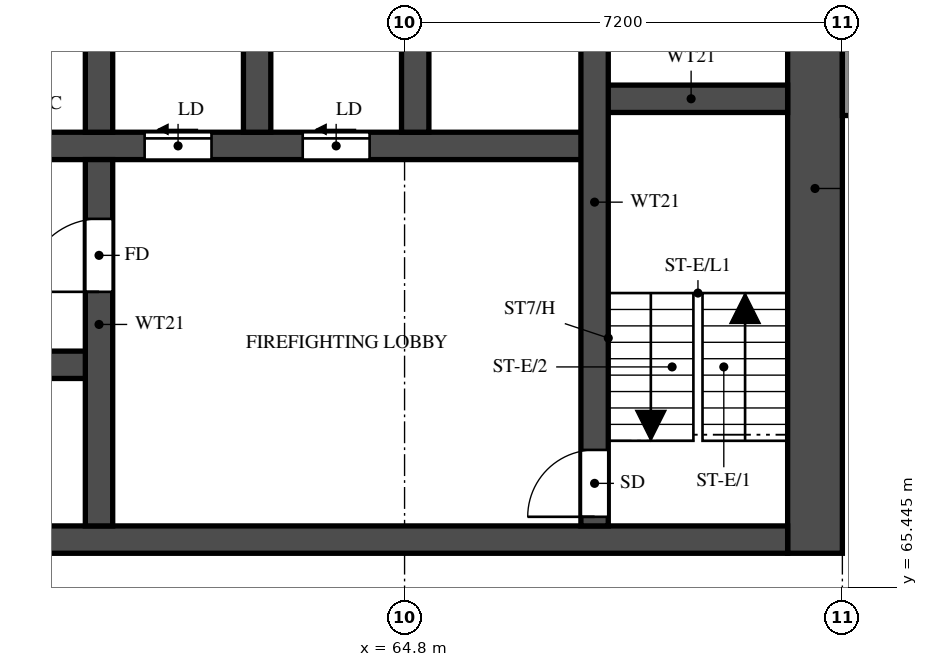
"""IFC4 building model, lengths in metres.
Left out: names, types, materials, properties, quantities, classifications, styles, units other than length and angle.
Written with IfcOpenShell. Run it as: python <this file> out.ifc"""

import sys

from ifc_helpers import new_model, si_unit, direction, frame, frame_2d, origin, place, context, subcontext, project, spatial, rectangle, extrude, element, fill, save


model = new_model("IFC4")
c1 = context("Model", 3, precision=1e-05, world=origin(), true_north=direction((0.0, 1.0)))
c2 = subcontext(c1, "Body", "Model", "MODEL_VIEW")
j1 = project(units=[si_unit("LENGTHUNIT", "METRE"), si_unit("PLANEANGLEUNIT", "RADIAN")], contexts=[c1])
p1 = place(None, origin())
s1 = spatial("IfcSite", under=j1, at=p1, CompositionType="ELEMENT")
p2 = place(p1, origin())
s2 = spatial("IfcBuilding", under=s1, at=p2, CompositionType="ELEMENT")
p3 = place(p2, frame((0.0, 0.0, 69.0)))
s3 = spatial("IfcBuildingStorey", under=s2, at=p3, CompositionType="ELEMENT", Elevation=69.0)
p4 = place(p3, frame((71.55, 66.0, 0.0), z_axis=(0.0, 0.0, 1.0), x_axis=(0.0, 1.0, 0.0)))
e1 = element("IfcWall", 1, at=p4, inside=s3, PredefinedType="SHEAR", context=c2, shape_type="SweptSolid", body=[
    extrude(rectangle(XDim=12.0, YDim=0.9, at=frame_2d((6.0, 0.0))), origin(), (0.0, 0.0, 1.0), 3.18),
])
p5 = place(p3, frame((29.7, 66.225, 0.0), z_axis=(0.0, 0.0, 1.0), x_axis=(1.0, 0.0, 0.0)))
e2 = element("IfcWall", 2, at=p5, inside=s3, PredefinedType="SHEAR", context=c2, shape_type="SweptSolid", body=[
    extrude(rectangle(XDim=41.4, YDim=0.45, at=frame_2d((20.7, 0.0))), origin(), (0.0, 0.0, 1.0), 3.18),
])
p6 = place(p5, frame((0.925, 0.0, 0.0)))
e3 = element("IfcOpeningElement", 3, at=p6, cuts=e2, PredefinedType="OPENING", context=c2, shape_type="SweptSolid", body=[
    extrude(rectangle(XDim=1.1, YDim=2.1, at=frame_2d((0.55, 1.05))), frame((0.0, 0.235, 0.0), z_axis=(0.0, -1.0, 0.0), x_axis=(1.0, 0.0, 0.0)), (0.0, 0.0, 1.0), 0.47),
])
p7 = place(p5, frame((3.738, 0.0, 0.0)))
e4 = element("IfcOpeningElement", 4, at=p7, cuts=e2, PredefinedType="OPENING", context=c2, shape_type="SweptSolid", body=[
    extrude(rectangle(XDim=1.8, YDim=2.1, at=frame_2d((0.9, 1.05))), frame((0.0, 0.235, 0.0), z_axis=(0.0, -1.0, 0.0), x_axis=(1.0, 0.0, 0.0)), (0.0, 0.0, 1.0), 0.47),
])
p8 = place(p3, frame((35.575, 69.1, 0.0), z_axis=(0.0, 0.0, 1.0), x_axis=(1.0, 0.0, 0.0)))
e5 = element("IfcWall", 5, at=p8, inside=s3, PredefinedType="SHEAR", context=c2, shape_type="SweptSolid", body=[
    extrude(rectangle(XDim=24.2, YDim=0.45, at=frame_2d((12.1, 0.0))), origin(), (0.0, 0.0, 1.0), 3.18),
])
p9 = place(p8, frame((1.05, 0.0, 0.0)))
e6 = element("IfcOpeningElement", 6, at=p9, cuts=e5, PredefinedType="OPENING", context=c2, shape_type="SweptSolid", body=[
    extrude(rectangle(XDim=1.1, YDim=2.1, at=frame_2d((0.55, 1.05))), frame((0.0, 0.235, 0.0), z_axis=(0.0, -1.0, 0.0), x_axis=(1.0, 0.0, 0.0)), (0.0, 0.0, 1.0), 0.47),
])
p10 = place(p8, frame((3.8, 0.0, 0.0)))
e7 = element("IfcOpeningElement", 7, at=p10, cuts=e5, PredefinedType="OPENING", context=c2, shape_type="SweptSolid", body=[
    extrude(rectangle(XDim=1.1, YDim=2.1, at=frame_2d((0.55, 1.05))), frame((0.0, 0.235, 0.0), z_axis=(0.0, -1.0, 0.0), x_axis=(1.0, 0.0, 0.0)), (0.0, 0.0, 1.0), 0.47),
])
p11 = place(p8, frame((6.55, 0.0, 0.0)))
e8 = element("IfcOpeningElement", 8, at=p11, cuts=e5, PredefinedType="OPENING", context=c2, shape_type="SweptSolid", body=[
    extrude(rectangle(XDim=1.1, YDim=2.1, at=frame_2d((0.55, 1.05))), frame((0.0, 0.235, 0.0), z_axis=(0.0, -1.0, 0.0), x_axis=(1.0, 0.0, 0.0)), (0.0, 0.0, 1.0), 0.47),
])
p12 = place(p8, frame((9.3, 0.0, 0.0)))
e9 = element("IfcOpeningElement", 9, at=p12, cuts=e5, PredefinedType="OPENING", context=c2, shape_type="SweptSolid", body=[
    extrude(rectangle(XDim=1.1, YDim=2.1, at=frame_2d((0.55, 1.05))), frame((0.0, 0.235, 0.0), z_axis=(0.0, -1.0, 0.0), x_axis=(1.0, 0.0, 0.0)), (0.0, 0.0, 1.0), 0.47),
])
p13 = place(p8, frame((12.05, 0.0, 0.0)))
e10 = element("IfcOpeningElement", 10, at=p13, cuts=e5, PredefinedType="OPENING", context=c2, shape_type="SweptSolid", body=[
    extrude(rectangle(XDim=1.1, YDim=2.1, at=frame_2d((0.55, 1.05))), frame((0.0, 0.235, 0.0), z_axis=(0.0, -1.0, 0.0), x_axis=(1.0, 0.0, 0.0)), (0.0, 0.0, 1.0), 0.47),
])
p14 = place(p8, frame((14.8, 0.0, 0.0)))
e11 = element("IfcOpeningElement", 11, at=p14, cuts=e5, PredefinedType="OPENING", context=c2, shape_type="SweptSolid", body=[
    extrude(rectangle(XDim=1.1, YDim=2.1, at=frame_2d((0.55, 1.05))), frame((0.0, 0.235, 0.0), z_axis=(0.0, -1.0, 0.0), x_axis=(1.0, 0.0, 0.0)), (0.0, 0.0, 1.0), 0.47),
])
p15 = place(p3, frame((32.875, 72.7, 0.0), z_axis=(0.0, 0.0, 1.0), x_axis=(1.0, 0.0, 0.0)))
e12 = element("IfcWall", 12, at=p15, inside=s3, PredefinedType="SHEAR", context=c2, shape_type="SweptSolid", body=[
    extrude(rectangle(XDim=35.05, YDim=0.45, at=frame_2d((17.525, 0.0))), origin(), (0.0, 0.0, 1.0), 3.18),
])
p16 = place(p15, frame((19.8, 0.0, 0.0)))
e13 = element("IfcOpeningElement", 13, at=p16, cuts=e12, PredefinedType="OPENING", context=c2, shape_type="SweptSolid", body=[
    extrude(rectangle(XDim=1.1, YDim=2.1, at=frame_2d((0.55, 1.05))), frame((0.0, 0.235, 0.0), z_axis=(0.0, -1.0, 0.0), x_axis=(1.0, 0.0, 0.0)), (0.0, 0.0, 1.0), 0.47),
])
p17 = place(p15, frame((27.65, 0.0, 0.0)))
e14 = element("IfcOpeningElement", 14, at=p17, cuts=e12, PredefinedType="OPENING", context=c2, shape_type="SweptSolid", body=[
    extrude(rectangle(XDim=1.1, YDim=2.1, at=frame_2d((0.55, 1.05))), frame((0.0, 0.235, 0.0), z_axis=(0.0, -1.0, 0.0), x_axis=(1.0, 0.0, 0.0)), (0.0, 0.0, 1.0), 0.47),
])
p18 = place(p15, frame((30.25, 0.0, 0.0)))
e15 = element("IfcOpeningElement", 15, at=p18, cuts=e12, PredefinedType="OPENING", context=c2, shape_type="SweptSolid", body=[
    extrude(rectangle(XDim=1.1, YDim=2.1, at=frame_2d((0.55, 1.05))), frame((0.0, 0.235, 0.0), z_axis=(0.0, -1.0, 0.0), x_axis=(1.0, 0.0, 0.0)), (0.0, 0.0, 1.0), 0.47),
])
p19 = place(p15, frame((3.75, 0.0, 0.0)))
e16 = element("IfcOpeningElement", 16, at=p19, cuts=e12, PredefinedType="OPENING", context=c2, shape_type="SweptSolid", body=[
    extrude(rectangle(XDim=1.1, YDim=2.1, at=frame_2d((0.55, 1.05))), frame((0.0, 0.235, 0.0), z_axis=(0.0, -1.0, 0.0), x_axis=(1.0, 0.0, 0.0)), (0.0, 0.0, 1.0), 0.47),
])
p20 = place(p15, frame((6.5, 0.0, 0.0)))
e17 = element("IfcOpeningElement", 17, at=p20, cuts=e12, PredefinedType="OPENING", context=c2, shape_type="SweptSolid", body=[
    extrude(rectangle(XDim=1.1, YDim=2.1, at=frame_2d((0.55, 1.05))), frame((0.0, 0.235, 0.0), z_axis=(0.0, -1.0, 0.0), x_axis=(1.0, 0.0, 0.0)), (0.0, 0.0, 1.0), 0.47),
])
p21 = place(p15, frame((9.25, 0.0, 0.0)))
e18 = element("IfcOpeningElement", 18, at=p21, cuts=e12, PredefinedType="OPENING", context=c2, shape_type="SweptSolid", body=[
    extrude(rectangle(XDim=1.1, YDim=2.1, at=frame_2d((0.55, 1.05))), frame((0.0, 0.235, 0.0), z_axis=(0.0, -1.0, 0.0), x_axis=(1.0, 0.0, 0.0)), (0.0, 0.0, 1.0), 0.47),
])
p22 = place(p15, frame((12.0, 0.0, 0.0)))
e19 = element("IfcOpeningElement", 19, at=p22, cuts=e12, PredefinedType="OPENING", context=c2, shape_type="SweptSolid", body=[
    extrude(rectangle(XDim=1.1, YDim=2.1, at=frame_2d((0.55, 1.05))), frame((0.0, 0.235, 0.0), z_axis=(0.0, -1.0, 0.0), x_axis=(1.0, 0.0, 0.0)), (0.0, 0.0, 1.0), 0.47),
])
p23 = place(p15, frame((14.75, 0.0, 0.0)))
e20 = element("IfcOpeningElement", 20, at=p23, cuts=e12, PredefinedType="OPENING", context=c2, shape_type="SweptSolid", body=[
    extrude(rectangle(XDim=1.1, YDim=2.1, at=frame_2d((0.55, 1.05))), frame((0.0, 0.235, 0.0), z_axis=(0.0, -1.0, 0.0), x_axis=(1.0, 0.0, 0.0)), (0.0, 0.0, 1.0), 0.47),
])
p24 = place(p15, frame((17.5, 0.0, 0.0)))
e21 = element("IfcOpeningElement", 21, at=p24, cuts=e12, PredefinedType="OPENING", context=c2, shape_type="SweptSolid", body=[
    extrude(rectangle(XDim=1.1, YDim=2.1, at=frame_2d((0.55, 1.05))), frame((0.0, 0.235, 0.0), z_axis=(0.0, -1.0, 0.0), x_axis=(1.0, 0.0, 0.0)), (0.0, 0.0, 1.0), 0.47),
])
p25 = place(p15, frame((0.913, 0.0, 0.0)))
e22 = element("IfcOpeningElement", 22, at=p25, cuts=e12, PredefinedType="OPENING", context=c2, shape_type="SweptSolid", body=[
    extrude(rectangle(XDim=1.1, YDim=2.1, at=frame_2d((0.55, 1.05))), frame((0.0, 0.235, 0.0), z_axis=(0.0, -1.0, 0.0), x_axis=(1.0, 0.0, 0.0)), (0.0, 0.0, 1.0), 0.47),
])
p26 = place(p3, frame((67.925, 73.475, 0.0), z_axis=(0.0, 0.0, 1.0), x_axis=(1.0, 0.0, 0.0)))
e23 = element("IfcWall", 23, at=p26, inside=s3, PredefinedType="SHEAR", context=c2, shape_type="SweptSolid", body=[
    extrude(rectangle(XDim=3.175, YDim=0.45, at=frame_2d((1.587, 0.0))), origin(), (0.0, 0.0, 1.0), 3.18),
])
p27 = place(p3, frame((67.925, 66.45, 0.0), z_axis=(0.0, 0.0, 1.0), x_axis=(0.0, 1.0, 0.0)))
e24 = element("IfcWall", 24, at=p27, inside=s3, PredefinedType="SHEAR", context=c2, shape_type="SweptSolid", body=[
    extrude(rectangle(XDim=10.65, YDim=0.45, at=frame_2d((5.325, 0.0))), origin(), (0.0, 0.0, 1.0), 3.18),
])
p28 = place(p27, frame((0.15, 0.0, 0.0)))
e25 = element("IfcOpeningElement", 25, at=p28, cuts=e24, PredefinedType="OPENING", context=c2, shape_type="SweptSolid", body=[
    extrude(rectangle(XDim=1.1, YDim=2.1, at=frame_2d((0.55, 1.05))), frame((0.0, 0.235, 0.0), z_axis=(0.0, -1.0, 0.0), x_axis=(1.0, 0.0, 0.0)), (0.0, 0.0, 1.0), 0.47),
])
p29 = place(p3, frame((59.775, 66.45, 0.0), z_axis=(0.0, 0.0, 1.0), x_axis=(0.0, 1.0, 0.0)))
e26 = element("IfcWall", 26, at=p29, inside=s3, PredefinedType="SHEAR", context=c2, shape_type="SweptSolid", body=[
    extrude(rectangle(XDim=6.025, YDim=0.45, at=frame_2d((3.013, 0.0))), origin(), (0.0, 0.0, 1.0), 3.18),
])
p30 = place(p29, frame((3.85, 0.0, 0.0)))
e27 = element("IfcOpeningElement", 27, at=p30, cuts=e26, PredefinedType="OPENING", context=c2, shape_type="SweptSolid", body=[
    extrude(rectangle(XDim=1.2, YDim=2.1, at=frame_2d((0.6, 1.05))), frame((0.0, 0.235, 0.0), z_axis=(0.0, -1.0, 0.0), x_axis=(1.0, 0.0, 0.0)), (0.0, 0.0, 1.0), 0.47),
])
for number, where, z_axis, x_axis in (
    (28, (59.775, 72.925, 0.0), (0.0, 0.0, 1.0), (0.0, 1.0, 0.0)),
    (29, (62.375, 72.925, 0.0), (0.0, 0.0, 1.0), (0.0, 1.0, 0.0)),
    (30, (64.975, 72.925, 0.0), (0.0, 0.0, 1.0), (0.0, 1.0, 0.0)),
):
    element("IfcWall", number, at=place(p3, frame(where, z_axis=z_axis, x_axis=x_axis)), inside=s3, PredefinedType="SHEAR", context=c2, shape_type="SweptSolid", body=[
        extrude(rectangle(XDim=2.95, YDim=0.45, at=frame_2d((1.475, 0.0))), origin(), (0.0, 0.0, 1.0), 3.18),
    ])
p31 = place(p3, frame((72.1, 73.2, 0.0), z_axis=(0.0, 0.0, 1.0), x_axis=(0.0, 1.0, 0.0)))
e31 = element("IfcWall", 31, at=p31, inside=s3, PredefinedType="SOLIDWALL", context=c2, shape_type="SweptSolid", body=[
    extrude(rectangle(XDim=4.8, YDim=0.2, at=frame_2d((2.4, 0.0))), origin(), (0.0, 0.0, 1.0), 3.18),
])
p32 = place(p28, origin())
e32 = element("IfcDoor", 32, at=p32, inside=s3, OperationType="SINGLE_SWING_LEFT", PredefinedType="DOOR", context=c2, shape_type="SweptSolid", body=[
    extrude(rectangle(XDim=1.1, YDim=2.1, at=frame_2d((0.55, 1.05))), frame((0.0, 0.025, 0.0), z_axis=(0.0, -1.0, 0.0), x_axis=(1.0, 0.0, 0.0)), (0.0, 0.0, 1.0), 0.05),
])
fill(e25, e32)
p33 = place(p30, origin())
e33 = element("IfcDoor", 33, at=p33, inside=s3, OperationType="SINGLE_SWING_RIGHT", PredefinedType="DOOR", context=c2, shape_type="SweptSolid", body=[
    extrude(rectangle(XDim=1.2, YDim=2.1, at=frame_2d((0.6, 1.05))), frame((0.0, 0.025, 0.0), z_axis=(0.0, -1.0, 0.0), x_axis=(1.0, 0.0, 0.0)), (0.0, 0.0, 1.0), 0.05),
])
fill(e27, e33)
p34 = place(p17, origin())
e34 = element("IfcDoor", 34, at=p34, inside=s3, OperationType="SLIDING_TO_LEFT", PredefinedType="DOOR", context=c2, shape_type="SweptSolid", body=[
    extrude(rectangle(XDim=1.1, YDim=2.1, at=frame_2d((0.55, 1.05))), frame((0.0, 0.025, 0.0), z_axis=(0.0, -1.0, 0.0), x_axis=(1.0, 0.0, 0.0)), (0.0, 0.0, 1.0), 0.05),
])
fill(e14, e34)
p35 = place(p18, origin())
e35 = element("IfcDoor", 35, at=p35, inside=s3, OperationType="SLIDING_TO_LEFT", PredefinedType="DOOR", context=c2, shape_type="SweptSolid", body=[
    extrude(rectangle(XDim=1.1, YDim=2.1, at=frame_2d((0.55, 1.05))), frame((0.0, 0.025, 0.0), z_axis=(0.0, -1.0, 0.0), x_axis=(1.0, 0.0, 0.0)), (0.0, 0.0, 1.0), 0.05),
])
fill(e15, e35)
save(model, sys.argv[1])
